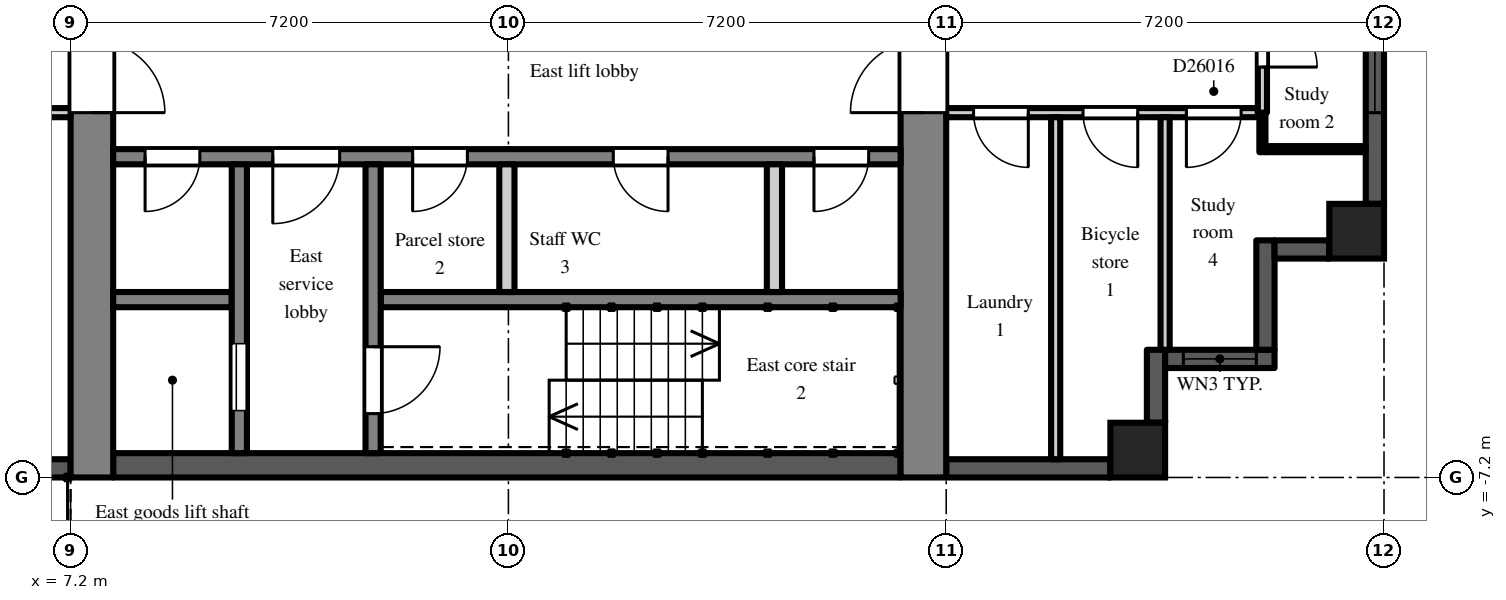
"""IFC4 building model, lengths in metres.
Left out: names, types, materials, properties, quantities, classifications, styles, units other than length and angle.
Written with IfcOpenShell. Run it as: python <this file> out.ifc"""

import sys

from ifc_helpers import new_model, si_unit, direction, frame, frame_2d, origin, origin_2d, place, context, subcontext, project, spatial, rectangle, extrude, element, fill, save


model = new_model("IFC4")
c1 = context("Model", 3, precision=1e-05, world=origin(), true_north=direction((0.0, 1.0)))
c2 = subcontext(c1, "Body", "Model", "MODEL_VIEW")
j1 = project(units=[si_unit("LENGTHUNIT", "METRE"), si_unit("PLANEANGLEUNIT", "RADIAN")], contexts=[c1])
p1 = place(None, origin())
s1 = spatial("IfcSite", under=j1, at=p1, CompositionType="ELEMENT")
p2 = place(p1, origin())
s2 = spatial("IfcBuilding", under=s1, at=p2, CompositionType="ELEMENT")
p3 = place(p2, frame((0.0, 0.0, 179.7)))
s3 = spatial("IfcBuildingStorey", under=s2, at=p3, CompositionType="ELEMENT", Elevation=179.7)
for number, where, z_axis, x_axis in (
    (1, (24.75, -6.75, 0.0), (0.0, 0.0, 1.0), (1.0, 0.0, 0.0)),
    (2, (28.35, -3.15, 0.0), (0.0, 0.0, 1.0), (1.0, 0.0, 0.0)),
):
    element("IfcColumn", number, at=place(p3, frame(where, z_axis=z_axis, x_axis=x_axis)), inside=s3, PredefinedType="COLUMN", context=c2, shape_type="SweptSolid", body=[
        extrude(rectangle(XDim=0.9, YDim=0.9, at=origin_2d()), origin(), (0.0, 0.0, 1.0), 3.0),
    ])
p4 = place(p3, frame((21.6, -7.05, 0.0), z_axis=(0.0, 0.0, 1.0), x_axis=(1.0, 0.0, 0.0)))
e3 = element("IfcWall", 3, at=p4, inside=s3, PredefinedType="SOLIDWALL", context=c2, shape_type="SweptSolid", body=[
    extrude(rectangle(XDim=2.7, YDim=0.3, at=frame_2d((1.35, 0.0))), origin(), (0.0, 0.0, 1.0), 2.2),
])
p5 = place(p3, frame((25.05, -6.3, 0.0), z_axis=(0.0, 0.0, 1.0), x_axis=(0.0, 1.0, 0.0)))
e4 = element("IfcWall", 4, at=p5, inside=s3, PredefinedType="SOLIDWALL", context=c2, shape_type="SweptSolid", body=[
    extrude(rectangle(XDim=1.2, YDim=0.3, at=frame_2d((0.6, 0.0))), origin(), (0.0, 0.0, 1.0), 2.6),
])
p6 = place(p3, frame((25.2, -5.25, 0.0), z_axis=(0.0, 0.0, 1.0), x_axis=(1.0, 0.0, 0.0)))
e5 = element("IfcWall", 5, at=p6, inside=s3, PredefinedType="SOLIDWALL", context=c2, shape_type="SweptSolid", body=[
    extrude(rectangle(XDim=1.8, YDim=0.3, at=frame_2d((0.9, 0.0))), origin(), (0.0, 0.0, 1.0), 2.6),
])
p7 = place(p6, frame((0.3, 0.0, 0.2)))
e6 = element("IfcOpeningElement", 6, at=p7, cuts=e5, PredefinedType="OPENING", context=c2, shape_type="SweptSolid", body=[
    extrude(rectangle(XDim=1.2, YDim=1.85, at=frame_2d((0.6, 0.925))), frame((0.0, 0.16, 0.0), z_axis=(0.0, -1.0, 0.0), x_axis=(1.0, 0.0, 0.0)), (0.0, 0.0, 1.0), 0.32),
])
p8 = place(p3, frame((26.85, -5.1, 0.0), z_axis=(0.0, 0.0, 1.0), x_axis=(0.0, 1.0, 0.0)))
e7 = element("IfcWall", 7, at=p8, inside=s3, PredefinedType="SOLIDWALL", context=c2, shape_type="SweptSolid", body=[
    extrude(rectangle(XDim=1.8, YDim=0.3, at=frame_2d((0.9, 0.0))), origin(), (0.0, 0.0, 1.0), 2.6),
])
p9 = place(p3, frame((27.0, -3.45, 0.0), z_axis=(0.0, 0.0, 1.0), x_axis=(1.0, 0.0, 0.0)))
e8 = element("IfcWall", 8, at=p9, inside=s3, PredefinedType="SOLIDWALL", context=c2, shape_type="SweptSolid", body=[
    extrude(rectangle(XDim=0.9, YDim=0.3, at=frame_2d((0.45, 0.0))), origin(), (0.0, 0.0, 1.0), 2.6),
])
p10 = place(p3, frame((28.65, -2.7, 0.0), z_axis=(0.0, 0.0, 1.0), x_axis=(0.0, 1.0, 0.0)))
e9 = element("IfcWall", 9, at=p10, inside=s3, PredefinedType="SOLIDWALL", context=c2, shape_type="SweptSolid", body=[
    extrude(rectangle(XDim=5.4, YDim=0.3, at=frame_2d((2.7, 0.0))), origin(), (0.0, 0.0, 1.0), 2.2),
])
p11 = place(p10, frame((1.5, 0.0, 0.2)))
e10 = element("IfcOpeningElement", 10, at=p11, cuts=e9, PredefinedType="OPENING", context=c2, shape_type="SweptSolid", body=[
    extrude(rectangle(XDim=2.4, YDim=1.85, at=frame_2d((1.2, 0.925))), frame((0.0, 0.16, 0.0), z_axis=(0.0, -1.0, 0.0), x_axis=(1.0, 0.0, 0.0)), (0.0, 0.0, 1.0), 0.32),
])
p12 = place(p3, frame((4.2, -7.05, 0.0), z_axis=(0.0, 0.0, 1.0), x_axis=(1.0, 0.0, 0.0)))
e11 = element("IfcWall", 11, at=p12, inside=s3, PredefinedType="SOLIDWALL", context=c2, shape_type="SweptSolid", body=[
    extrude(rectangle(XDim=3.0, YDim=0.3, at=frame_2d((1.5, 0.0))), origin(), (0.0, 0.0, 1.0), 2.2),
])
p13 = place(p3, frame((7.55, -7.2, 0.0), z_axis=(0.0, 0.0, 1.0), x_axis=(0.0, 1.0, 0.0)))
e12 = element("IfcWall", 12, at=p13, inside=s3, PredefinedType="SHEAR", context=c2, shape_type="SweptSolid", body=[
    extrude(rectangle(XDim=14.4, YDim=0.7, at=frame_2d((7.2, 0.0))), origin(), (0.0, 0.0, 1.0), 2.6),
])
p14 = place(p13, frame((6.0, 0.0, 0.0)))
e13 = element("IfcOpeningElement", 13, at=p14, cuts=e12, PredefinedType="OPENING", context=c2, shape_type="SweptSolid", body=[
    extrude(rectangle(XDim=2.4, YDim=2.2, at=frame_2d((1.2, 1.1))), frame((0.0, 0.36, 0.0), z_axis=(0.0, -1.0, 0.0), x_axis=(1.0, 0.0, 0.0)), (0.0, 0.0, 1.0), 0.72),
])
p15 = place(p3, frame((21.225, -7.2, 0.0), z_axis=(0.0, 0.0, 1.0), x_axis=(0.0, 1.0, 0.0)))
e14 = element("IfcWall", 14, at=p15, inside=s3, PredefinedType="SHEAR", context=c2, shape_type="SweptSolid", body=[
    extrude(rectangle(XDim=14.4, YDim=0.75, at=frame_2d((7.2, 0.0))), origin(), (0.0, 0.0, 1.0), 2.6),
])
p16 = place(p15, frame((6.0, 0.0, 0.0)))
e15 = element("IfcOpeningElement", 15, at=p16, cuts=e14, PredefinedType="OPENING", context=c2, shape_type="SweptSolid", body=[
    extrude(rectangle(XDim=2.4, YDim=2.2, at=frame_2d((1.2, 1.1))), frame((0.0, 0.385, 0.0), z_axis=(0.0, -1.0, 0.0), x_axis=(1.0, 0.0, 0.0)), (0.0, 0.0, 1.0), 0.77),
])
p17 = place(p3, frame((7.9, -7.0, 0.0), z_axis=(0.0, 0.0, 1.0), x_axis=(1.0, 0.0, 0.0)))
e16 = element("IfcWall", 16, at=p17, inside=s3, PredefinedType="SHEAR", context=c2, shape_type="SweptSolid", body=[
    extrude(rectangle(XDim=12.95, YDim=0.4, at=frame_2d((6.475, 0.0))), origin(), (0.0, 0.0, 1.0), 2.6),
])
p18 = place(p3, frame((7.9, -1.925, 0.0), z_axis=(0.0, 0.0, 1.0), x_axis=(1.0, 0.0, 0.0)))
e17 = element("IfcWall", 17, at=p18, inside=s3, PredefinedType="SHEAR", context=c2, shape_type="SweptSolid", body=[
    extrude(rectangle(XDim=12.95, YDim=0.25, at=frame_2d((6.475, 0.0))), origin(), (0.0, 0.0, 1.0), 2.6),
])
p19 = place(p18, frame((0.525, 0.0, 0.0)))
e18 = element("IfcOpeningElement", 18, at=p19, cuts=e17, PredefinedType="OPENING", context=c2, shape_type="SweptSolid", body=[
    extrude(rectangle(XDim=0.9, YDim=2.1, at=frame_2d((0.45, 1.05))), frame((0.0, 0.135, 0.0), z_axis=(0.0, -1.0, 0.0), x_axis=(1.0, 0.0, 0.0)), (0.0, 0.0, 1.0), 0.27),
])
p20 = place(p18, frame((2.625, 0.0, 0.0)))
e19 = element("IfcOpeningElement", 19, at=p20, cuts=e17, PredefinedType="OPENING", context=c2, shape_type="SweptSolid", body=[
    extrude(rectangle(XDim=1.1, YDim=2.1, at=frame_2d((0.55, 1.05))), frame((0.0, 0.135, 0.0), z_axis=(0.0, -1.0, 0.0), x_axis=(1.0, 0.0, 0.0)), (0.0, 0.0, 1.0), 0.27),
])
p21 = place(p18, frame((4.925, 0.0, 0.0)))
e20 = element("IfcOpeningElement", 20, at=p21, cuts=e17, PredefinedType="OPENING", context=c2, shape_type="SweptSolid", body=[
    extrude(rectangle(XDim=0.9, YDim=2.1, at=frame_2d((0.45, 1.05))), frame((0.0, 0.135, 0.0), z_axis=(0.0, -1.0, 0.0), x_axis=(1.0, 0.0, 0.0)), (0.0, 0.0, 1.0), 0.27),
])
p22 = place(p18, frame((8.225, 0.0, 0.0)))
e21 = element("IfcOpeningElement", 21, at=p22, cuts=e17, PredefinedType="OPENING", context=c2, shape_type="SweptSolid", body=[
    extrude(rectangle(XDim=0.9, YDim=2.1, at=frame_2d((0.45, 1.05))), frame((0.0, 0.135, 0.0), z_axis=(0.0, -1.0, 0.0), x_axis=(1.0, 0.0, 0.0)), (0.0, 0.0, 1.0), 0.27),
])
p23 = place(p18, frame((11.525, 0.0, 0.0)))
e22 = element("IfcOpeningElement", 22, at=p23, cuts=e17, PredefinedType="OPENING", context=c2, shape_type="SweptSolid", body=[
    extrude(rectangle(XDim=0.9, YDim=2.1, at=frame_2d((0.45, 1.05))), frame((0.0, 0.135, 0.0), z_axis=(0.0, -1.0, 0.0), x_axis=(1.0, 0.0, 0.0)), (0.0, 0.0, 1.0), 0.27),
])
p24 = place(p3, frame((7.9, -4.275, 0.0), z_axis=(0.0, 0.0, 1.0), x_axis=(1.0, 0.0, 0.0)))
e23 = element("IfcWall", 23, at=p24, inside=s3, PredefinedType="SHEAR", context=c2, shape_type="SweptSolid", body=[
    extrude(rectangle(XDim=1.95, YDim=0.25, at=frame_2d((0.975, 0.0))), origin(), (0.0, 0.0, 1.0), 2.6),
])
p25 = place(p3, frame((12.3, -4.275, 0.0), z_axis=(0.0, 0.0, 1.0), x_axis=(1.0, 0.0, 0.0)))
e24 = element("IfcWall", 24, at=p25, inside=s3, PredefinedType="SHEAR", context=c2, shape_type="SweptSolid", body=[
    extrude(rectangle(XDim=8.55, YDim=0.25, at=frame_2d((4.275, 0.0))), origin(), (0.0, 0.0, 1.0), 2.6),
])
p26 = place(p3, frame((9.975, -2.05, 0.0), z_axis=(0.0, 0.0, 1.0), x_axis=(0.0, -1.0, 0.0)))
e25 = element("IfcWall", 25, at=p26, inside=s3, PredefinedType="SHEAR", context=c2, shape_type="SweptSolid", body=[
    extrude(rectangle(XDim=4.75, YDim=0.25, at=frame_2d((2.375, 0.0))), origin(), (0.0, 0.0, 1.0), 2.6),
])
p27 = place(p26, frame((2.95, 0.0, 0.0)))
e26 = element("IfcOpeningElement", 26, at=p27, cuts=e25, PredefinedType="OPENING", context=c2, shape_type="SweptSolid", body=[
    extrude(rectangle(XDim=1.1, YDim=2.1, at=frame_2d((0.55, 1.05))), frame((0.0, 0.135, 0.0), z_axis=(0.0, -1.0, 0.0), x_axis=(1.0, 0.0, 0.0)), (0.0, 0.0, 1.0), 0.27),
])
p28 = place(p3, frame((12.175, -2.05, 0.0), z_axis=(0.0, 0.0, 1.0), x_axis=(0.0, -1.0, 0.0)))
e27 = element("IfcWall", 27, at=p28, inside=s3, PredefinedType="SHEAR", context=c2, shape_type="SweptSolid", body=[
    extrude(rectangle(XDim=4.75, YDim=0.25, at=frame_2d((2.375, 0.0))), origin(), (0.0, 0.0, 1.0), 2.6),
])
p29 = place(p28, frame((3.0, 0.0, 0.0)))
e28 = element("IfcOpeningElement", 28, at=p29, cuts=e27, PredefinedType="OPENING", context=c2, shape_type="SweptSolid", body=[
    extrude(rectangle(XDim=1.1, YDim=2.1, at=frame_2d((0.55, 1.05))), frame((0.0, 0.135, 0.0), z_axis=(0.0, -1.0, 0.0), x_axis=(1.0, 0.0, 0.0)), (0.0, 0.0, 1.0), 0.27),
])
for number, where, z_axis, x_axis in (
    (29, (14.375, -2.05, 0.0), (0.0, 0.0, 1.0), (0.0, -1.0, 0.0)),
    (30, (18.775, -2.05, 0.0), (0.0, 0.0, 1.0), (0.0, -1.0, 0.0)),
):
    element("IfcWall", number, at=place(p3, frame(where, z_axis=z_axis, x_axis=x_axis)), inside=s3, PredefinedType="PARTITIONING", context=c2, shape_type="SweptSolid", body=[
        extrude(rectangle(XDim=2.1, YDim=0.25, at=frame_2d((1.05, 0.0))), origin(), (0.0, 0.0, 1.0), 2.6),
    ])
p30 = place(p3, frame((1.275, -1.2, 0.0), z_axis=(0.0, 0.0, 1.0), x_axis=(1.0, 0.0, 0.0)))
e31 = element("IfcWall", 31, at=p30, inside=s3, PredefinedType="PARTITIONING", context=c2, shape_type="SweptSolid", body=[
    extrude(rectangle(XDim=5.925, YDim=0.15, at=frame_2d((2.962, 0.0))), origin(), (0.0, 0.0, 1.0), 2.6),
])
p31 = place(p30, frame((3.475, 0.0, 0.0)))
e32 = element("IfcOpeningElement", 32, at=p31, cuts=e31, PredefinedType="OPENING", context=c2, shape_type="SweptSolid", body=[
    extrude(rectangle(XDim=0.9, YDim=2.1, at=frame_2d((0.45, 1.05))), frame((0.0, 0.085, 0.0), z_axis=(0.0, -1.0, 0.0), x_axis=(1.0, 0.0, 0.0)), (0.0, 0.0, 1.0), 0.17),
])
p32 = place(p3, frame((21.6, -1.2, 0.0), z_axis=(0.0, 0.0, 1.0), x_axis=(1.0, 0.0, 0.0)))
e33 = element("IfcWall", 33, at=p32, inside=s3, PredefinedType="PARTITIONING", context=c2, shape_type="SweptSolid", body=[
    extrude(rectangle(XDim=5.125, YDim=0.15, at=frame_2d((2.562, 0.0))), origin(), (0.0, 0.0, 1.0), 2.6),
])
p33 = place(p32, frame((0.45, 0.0, 0.0)))
e34 = element("IfcOpeningElement", 34, at=p33, cuts=e33, PredefinedType="OPENING", context=c2, shape_type="SweptSolid", body=[
    extrude(rectangle(XDim=0.9, YDim=2.1, at=frame_2d((0.45, 1.05))), frame((0.0, 0.085, 0.0), z_axis=(0.0, -1.0, 0.0), x_axis=(1.0, 0.0, 0.0)), (0.0, 0.0, 1.0), 0.17),
])
p34 = place(p32, frame((2.25, 0.0, 0.0)))
e35 = element("IfcOpeningElement", 35, at=p34, cuts=e33, PredefinedType="OPENING", context=c2, shape_type="SweptSolid", body=[
    extrude(rectangle(XDim=0.9, YDim=2.1, at=frame_2d((0.45, 1.05))), frame((0.0, 0.085, 0.0), z_axis=(0.0, -1.0, 0.0), x_axis=(1.0, 0.0, 0.0)), (0.0, 0.0, 1.0), 0.17),
])
p35 = place(p32, frame((3.95, 0.0, 0.0)))
e36 = element("IfcOpeningElement", 36, at=p35, cuts=e33, PredefinedType="OPENING", context=c2, shape_type="SweptSolid", body=[
    extrude(rectangle(XDim=0.9, YDim=2.1, at=frame_2d((0.45, 1.05))), frame((0.0, 0.085, 0.0), z_axis=(0.0, -1.0, 0.0), x_axis=(1.0, 0.0, 0.0)), (0.0, 0.0, 1.0), 0.17),
])
p36 = place(p3, frame((23.4, -6.9, 0.0), z_axis=(0.0, 0.0, 1.0), x_axis=(0.0, 1.0, 0.0)))
e37 = element("IfcWall", 37, at=p36, inside=s3, PredefinedType="PARTITIONING", context=c2, shape_type="SweptSolid", body=[
    extrude(rectangle(XDim=5.625, YDim=0.15, at=frame_2d((2.812, 0.0))), origin(), (0.0, 0.0, 1.0), 2.6),
])
p37 = place(p3, frame((25.2, -5.1, 0.0), z_axis=(0.0, 0.0, 1.0), x_axis=(0.0, 1.0, 0.0)))
e38 = element("IfcWall", 38, at=p37, inside=s3, PredefinedType="PARTITIONING", context=c2, shape_type="SweptSolid", body=[
    extrude(rectangle(XDim=3.825, YDim=0.15, at=frame_2d((1.913, 0.0))), origin(), (0.0, 0.0, 1.0), 2.6),
])
p38 = place(p3, frame((26.8, -1.85, 0.0), z_axis=(0.0, 0.0, 1.0), x_axis=(0.0, 1.0, 0.0)))
e39 = element("IfcWall", 39, at=p38, inside=s3, PredefinedType="PARTITIONING", context=c2, shape_type="SweptSolid", body=[
    extrude(rectangle(XDim=0.65, YDim=0.1, at=frame_2d((0.325, 0.0))), origin(), (0.0, 0.0, 1.0), 2.6),
])
p39 = place(p3, frame((26.85, -1.8, 0.0), z_axis=(0.0, 0.0, 1.0), x_axis=(1.0, 0.0, 0.0)))
e40 = element("IfcWall", 40, at=p39, inside=s3, PredefinedType="PARTITIONING", context=c2, shape_type="SweptSolid", body=[
    extrude(rectangle(XDim=1.65, YDim=0.1, at=frame_2d((0.825, 0.0))), origin(), (0.0, 0.0, 1.0), 2.6),
])
p40 = place(p3, frame((26.8, -1.2, 0.0), z_axis=(0.0, 0.0, 1.0), x_axis=(0.0, 1.0, 0.0)))
e41 = element("IfcWall", 41, at=p40, inside=s3, PredefinedType="PARTITIONING", context=c2, shape_type="SweptSolid", body=[
    extrude(rectangle(XDim=2.4, YDim=0.15, at=frame_2d((1.2, 0.0))), origin(), (0.0, 0.0, 1.0), 2.6),
])
p41 = place(p40, frame((0.75, 0.0, 0.0)))
e42 = element("IfcOpeningElement", 42, at=p41, cuts=e41, PredefinedType="OPENING", context=c2, shape_type="SweptSolid", body=[
    extrude(rectangle(XDim=0.9, YDim=2.1, at=frame_2d((0.45, 1.05))), frame((0.0, 0.085, 0.0), z_axis=(0.0, -1.0, 0.0), x_axis=(1.0, 0.0, 0.0)), (0.0, 0.0, 1.0), 0.17),
])
p42 = place(p7, origin())
e43 = element("IfcWindow", 43, at=p42, inside=s3, PartitioningType="SINGLE_PANEL", PredefinedType="WINDOW", context=c2, shape_type="SweptSolid", body=[
    extrude(rectangle(XDim=1.2, YDim=1.85, at=frame_2d((0.6, 0.925))), frame((0.0, 0.03, 0.0), z_axis=(0.0, -1.0, 0.0), x_axis=(1.0, 0.0, 0.0)), (0.0, 0.0, 1.0), 0.06),
])
fill(e6, e43)
p43 = place(p11, origin())
e44 = element("IfcWindow", 44, at=p43, inside=s3, PartitioningType="SINGLE_PANEL", PredefinedType="WINDOW", context=c2, shape_type="SweptSolid", body=[
    extrude(rectangle(XDim=2.4, YDim=1.85, at=frame_2d((1.2, 0.925))), frame((0.0, 0.03, 0.0), z_axis=(0.0, -1.0, 0.0), x_axis=(1.0, 0.0, 0.0)), (0.0, 0.0, 1.0), 0.06),
])
fill(e10, e44)
p44 = place(p27, origin())
e45 = element("IfcDoor", 45, at=p44, inside=s3, OperationType="SLIDING_TO_LEFT", PredefinedType="DOOR", context=c2, shape_type="SweptSolid", body=[
    extrude(rectangle(XDim=1.1, YDim=2.1, at=frame_2d((0.55, 1.05))), frame((0.0, 0.025, 0.0), z_axis=(0.0, -1.0, 0.0), x_axis=(1.0, 0.0, 0.0)), (0.0, 0.0, 1.0), 0.05),
])
fill(e26, e45)
p45 = place(p29, origin())
e46 = element("IfcDoor", 46, at=p45, inside=s3, OperationType="SINGLE_SWING_LEFT", PredefinedType="DOOR", context=c2, shape_type="SweptSolid", body=[
    extrude(rectangle(XDim=1.1, YDim=2.1, at=frame_2d((0.55, 1.05))), frame((0.0, 0.025, 0.0), z_axis=(0.0, -1.0, 0.0), x_axis=(1.0, 0.0, 0.0)), (0.0, 0.0, 1.0), 0.05),
])
fill(e28, e46)
p46 = place(p19, frame((0.9, 0.0, 0.0), z_axis=(0.0, 0.0, 1.0), x_axis=(-1.0, 0.0, 0.0)))
e47 = element("IfcDoor", 47, at=p46, inside=s3, OperationType="SINGLE_SWING_RIGHT", PredefinedType="DOOR", context=c2, shape_type="SweptSolid", body=[
    extrude(rectangle(XDim=0.9, YDim=2.1, at=frame_2d((0.45, 1.05))), frame((0.0, 0.025, 0.0), z_axis=(0.0, -1.0, 0.0), x_axis=(1.0, 0.0, 0.0)), (0.0, 0.0, 1.0), 0.05),
])
fill(e18, e47)
p47 = place(p20, frame((1.1, 0.0, 0.0), z_axis=(0.0, 0.0, 1.0), x_axis=(-1.0, 0.0, 0.0)))
e48 = element("IfcDoor", 48, at=p47, inside=s3, OperationType="SINGLE_SWING_RIGHT", PredefinedType="DOOR", context=c2, shape_type="SweptSolid", body=[
    extrude(rectangle(XDim=1.1, YDim=2.1, at=frame_2d((0.55, 1.05))), frame((0.0, 0.025, 0.0), z_axis=(0.0, -1.0, 0.0), x_axis=(1.0, 0.0, 0.0)), (0.0, 0.0, 1.0), 0.05),
])
fill(e19, e48)
p48 = place(p14, frame((2.4, 0.0, 0.0), z_axis=(0.0, 0.0, 1.0), x_axis=(-1.0, 0.0, 0.0)))
e49 = element("IfcDoor", 49, at=p48, inside=s3, OperationType="DOUBLE_DOOR_DOUBLE_SWING", PredefinedType="DOOR", context=c2, shape_type="SweptSolid", body=[
    extrude(rectangle(XDim=2.4, YDim=2.2, at=frame_2d((1.2, 1.1))), frame((0.0, 0.025, 0.0), z_axis=(0.0, -1.0, 0.0), x_axis=(1.0, 0.0, 0.0)), (0.0, 0.0, 1.0), 0.05),
])
fill(e13, e49)
p49 = place(p16, origin())
e50 = element("IfcDoor", 50, at=p49, inside=s3, OperationType="DOUBLE_DOOR_DOUBLE_SWING", PredefinedType="DOOR", context=c2, shape_type="SweptSolid", body=[
    extrude(rectangle(XDim=2.4, YDim=2.2, at=frame_2d((1.2, 1.1))), frame((0.0, 0.025, 0.0), z_axis=(0.0, -1.0, 0.0), x_axis=(1.0, 0.0, 0.0)), (0.0, 0.0, 1.0), 0.05),
])
fill(e15, e50)
p50 = place(p21, frame((0.9, 0.0, 0.0), z_axis=(0.0, 0.0, 1.0), x_axis=(-1.0, 0.0, 0.0)))
e51 = element("IfcDoor", 51, at=p50, inside=s3, OperationType="SINGLE_SWING_RIGHT", PredefinedType="DOOR", context=c2, shape_type="SweptSolid", body=[
    extrude(rectangle(XDim=0.9, YDim=2.1, at=frame_2d((0.45, 1.05))), frame((0.0, 0.025, 0.0), z_axis=(0.0, -1.0, 0.0), x_axis=(1.0, 0.0, 0.0)), (0.0, 0.0, 1.0), 0.05),
])
fill(e20, e51)
p51 = place(p22, frame((0.9, 0.0, 0.0), z_axis=(0.0, 0.0, 1.0), x_axis=(-1.0, 0.0, 0.0)))
e52 = element("IfcDoor", 52, at=p51, inside=s3, OperationType="SINGLE_SWING_LEFT", PredefinedType="DOOR", context=c2, shape_type="SweptSolid", body=[
    extrude(rectangle(XDim=0.9, YDim=2.1, at=frame_2d((0.45, 1.05))), frame((0.0, 0.025, 0.0), z_axis=(0.0, -1.0, 0.0), x_axis=(1.0, 0.0, 0.0)), (0.0, 0.0, 1.0), 0.05),
])
fill(e21, e52)
p52 = place(p23, frame((0.9, 0.0, 0.0), z_axis=(0.0, 0.0, 1.0), x_axis=(-1.0, 0.0, 0.0)))
e53 = element("IfcDoor", 53, at=p52, inside=s3, OperationType="SINGLE_SWING_RIGHT", PredefinedType="DOOR", context=c2, shape_type="SweptSolid", body=[
    extrude(rectangle(XDim=0.9, YDim=2.1, at=frame_2d((0.45, 1.05))), frame((0.0, 0.025, 0.0), z_axis=(0.0, -1.0, 0.0), x_axis=(1.0, 0.0, 0.0)), (0.0, 0.0, 1.0), 0.05),
])
fill(e22, e53)
p53 = place(p41, frame((0.9, 0.0, 0.0), z_axis=(0.0, 0.0, 1.0), x_axis=(-1.0, 0.0, 0.0)))
e54 = element("IfcDoor", 54, at=p53, inside=s3, OperationType="SINGLE_SWING_RIGHT", PredefinedType="DOOR", context=c2, shape_type="SweptSolid", body=[
    extrude(rectangle(XDim=0.9, YDim=2.1, at=frame_2d((0.45, 1.05))), frame((0.0, 0.025, 0.0), z_axis=(0.0, -1.0, 0.0), x_axis=(1.0, 0.0, 0.0)), (0.0, 0.0, 1.0), 0.05),
])
fill(e42, e54)
p54 = place(p33, frame((0.9, 0.0, 0.0), z_axis=(0.0, 0.0, 1.0), x_axis=(-1.0, 0.0, 0.0)))
e55 = element("IfcDoor", 55, at=p54, inside=s3, OperationType="SINGLE_SWING_LEFT", PredefinedType="DOOR", context=c2, shape_type="SweptSolid", body=[
    extrude(rectangle(XDim=0.9, YDim=2.1, at=frame_2d((0.45, 1.05))), frame((0.0, 0.025, 0.0), z_axis=(0.0, -1.0, 0.0), x_axis=(1.0, 0.0, 0.0)), (0.0, 0.0, 1.0), 0.05),
])
fill(e34, e55)
p55 = place(p34, frame((0.9, 0.0, 0.0), z_axis=(0.0, 0.0, 1.0), x_axis=(-1.0, 0.0, 0.0)))
e56 = element("IfcDoor", 56, at=p55, inside=s3, OperationType="SINGLE_SWING_LEFT", PredefinedType="DOOR", context=c2, shape_type="SweptSolid", body=[
    extrude(rectangle(XDim=0.9, YDim=2.1, at=frame_2d((0.45, 1.05))), frame((0.0, 0.025, 0.0), z_axis=(0.0, -1.0, 0.0), x_axis=(1.0, 0.0, 0.0)), (0.0, 0.0, 1.0), 0.05),
])
fill(e35, e56)
p56 = place(p35, frame((0.9, 0.0, 0.0), z_axis=(0.0, 0.0, 1.0), x_axis=(-1.0, 0.0, 0.0)))
e57 = element("IfcDoor", 57, at=p56, inside=s3, OperationType="SINGLE_SWING_RIGHT", PredefinedType="DOOR", context=c2, shape_type="SweptSolid", body=[
    extrude(rectangle(XDim=0.9, YDim=2.1, at=frame_2d((0.45, 1.05))), frame((0.0, 0.025, 0.0), z_axis=(0.0, -1.0, 0.0), x_axis=(1.0, 0.0, 0.0)), (0.0, 0.0, 1.0), 0.05),
])
fill(e36, e57)
save(model, sys.argv[1])
